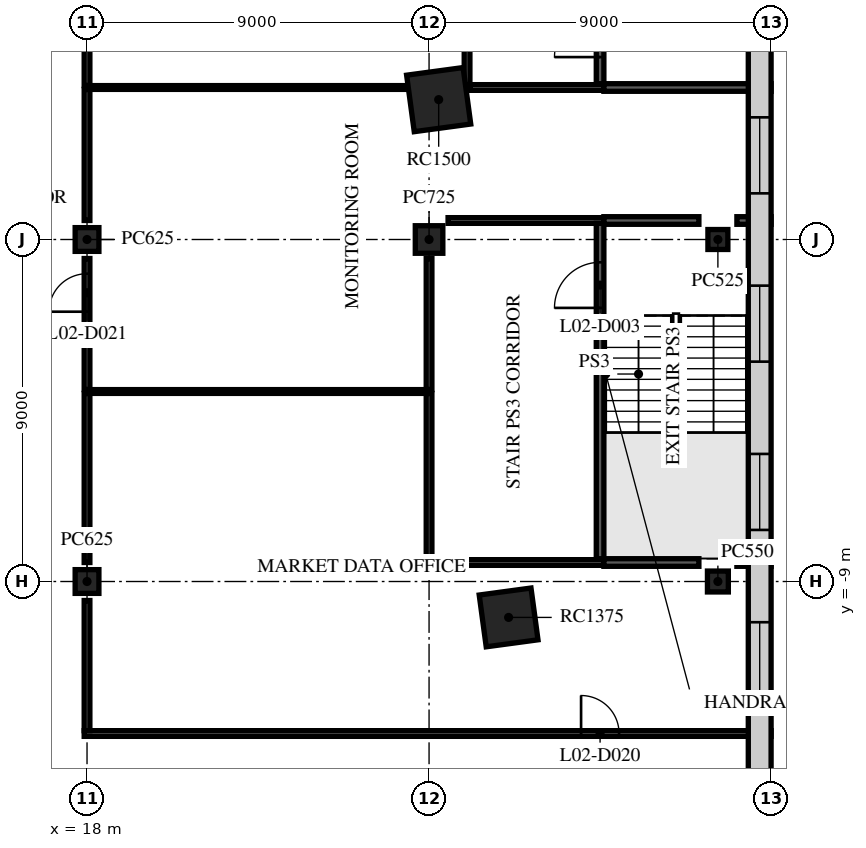
"""IFC4 building model, lengths in metres.
Left out: names, types, materials, properties, quantities, classifications, styles, units other than length and angle.
Written with IfcOpenShell. Run it as: python <this file> out.ifc"""

import sys

from ifc_helpers import new_model, si_unit, direction, frame, frame_2d, origin, origin_2d, place, context, subcontext, project, spatial, rectangle, extrude, element, fill, save


model = new_model("IFC4")
c1 = context("Model", 3, precision=1e-05, world=origin(), true_north=direction((0.0, 1.0)))
c2 = subcontext(c1, "Body", "Model", "MODEL_VIEW")
j1 = project(units=[si_unit("LENGTHUNIT", "METRE"), si_unit("PLANEANGLEUNIT", "RADIAN")], contexts=[c1])
p1 = place(None, origin())
s1 = spatial("IfcSite", under=j1, at=p1, CompositionType="ELEMENT")
p2 = place(p1, origin())
s2 = spatial("IfcBuilding", under=s1, at=p2, CompositionType="ELEMENT")
p3 = place(p2, frame((0.0, 0.0, 9.0)))
s3 = spatial("IfcBuildingStorey", under=s2, at=p3, CompositionType="ELEMENT", Elevation=9.0)
for number, where, z_axis, x_axis in (
    (1, (18.0, -9.0, 0.0), (0.0, 0.0, 1.0), (1.0, 0.0, 0.0)),
    (2, (18.0, 0.0, 0.0), (0.0, 0.0, 1.0), (1.0, 0.0, 0.0)),
):
    element("IfcColumn", number, at=place(p3, frame(where, z_axis=z_axis, x_axis=x_axis)), inside=s3, PredefinedType="COLUMN", context=c2, shape_type="SweptSolid", body=[
        extrude(rectangle(XDim=0.625, YDim=0.625, at=origin_2d()), origin(), (0.0, 0.0, 1.0), 4.5),
    ])
p4 = place(p3, frame((27.0, 0.0, 0.0), z_axis=(0.0, 0.0, 1.0), x_axis=(1.0, 0.0, 0.0)))
e3 = element("IfcColumn", 3, at=p4, inside=s3, PredefinedType="COLUMN", context=c2, shape_type="SweptSolid", body=[
    extrude(rectangle(XDim=0.725, YDim=0.725, at=origin_2d()), origin(), (0.0, 0.0, 1.0), 4.5),
])
p5 = place(p3, frame((34.6, -9.0, 0.0), z_axis=(0.0, 0.0, 1.0), x_axis=(1.0, 0.0, 0.0)))
e4 = element("IfcColumn", 4, at=p5, inside=s3, PredefinedType="COLUMN", context=c2, shape_type="SweptSolid", body=[
    extrude(rectangle(XDim=0.55, YDim=0.55, at=origin_2d()), origin(), (0.0, 0.0, 1.0), 4.5),
])
p6 = place(p3, frame((34.6, 0.0, 0.0), z_axis=(0.0, 0.0, 1.0), x_axis=(1.0, 0.0, 0.0)))
e5 = element("IfcColumn", 5, at=p6, inside=s3, PredefinedType="COLUMN", context=c2, shape_type="SweptSolid", body=[
    extrude(rectangle(XDim=0.525, YDim=0.525, at=origin_2d()), origin(), (0.0, 0.0, 1.0), 4.5),
])
p7 = place(p3, frame((29.093, -9.945, 0.0), z_axis=(0.0, 0.0, 1.0), x_axis=(0.991001197216, 0.133853005627, 0.0)))
e6 = element("IfcColumn", 6, at=p7, inside=s3, PredefinedType="COLUMN", context=c2, shape_type="SweptSolid", body=[
    extrude(rectangle(XDim=1.375, YDim=1.375, at=origin_2d()), origin(), (0.0, 0.0, 1.0), 4.5),
])
p8 = place(p3, frame((27.253, 3.681, 0.0), z_axis=(0.0, 0.0, 1.0), x_axis=(0.991001197216, 0.133853005627, 0.0)))
e7 = element("IfcColumn", 7, at=p8, inside=s3, PredefinedType="COLUMN", context=c2, shape_type="SweptSolid", body=[
    extrude(rectangle(XDim=1.5, YDim=1.5, at=origin_2d()), origin(), (0.0, 0.0, 1.0), 4.5),
])
p9 = place(p3, frame((17.925, -13.0, 0.0), z_axis=(0.0, 0.0, 1.0), x_axis=(1.0, 0.0, 0.0)))
e8 = element("IfcWall", 8, at=p9, inside=s3, PredefinedType="PARTITIONING", context=c2, shape_type="SweptSolid", body=[
    extrude(rectangle(XDim=18.075, YDim=0.15, at=frame_2d((9.038, 0.0))), origin(), (0.0, 0.0, 1.0), 4.1),
])
p10 = place(p9, frame((13.075, 0.0, 0.0)))
e9 = element("IfcOpeningElement", 9, at=p10, cuts=e8, PredefinedType="OPENING", context=c2, shape_type="SweptSolid", body=[
    extrude(rectangle(XDim=1.0, YDim=2.1, at=frame_2d((0.5, 1.05))), frame((0.0, 0.085, 0.0), z_axis=(0.0, -1.0, 0.0), x_axis=(1.0, 0.0, 0.0)), (0.0, 0.0, 1.0), 0.17),
])
p11 = place(p3, frame((26.925, -8.5, 0.0), z_axis=(0.0, 0.0, 1.0), x_axis=(1.0, 0.0, 0.0)))
e10 = element("IfcWall", 10, at=p11, inside=s3, PredefinedType="PARTITIONING", context=c2, shape_type="SweptSolid", body=[
    extrude(rectangle(XDim=4.675, YDim=0.15, at=frame_2d((2.337, 0.0))), origin(), (0.0, 0.0, 1.0), 4.1),
])
p12 = place(p3, frame((31.6, -8.5, 0.0), z_axis=(0.0, 0.0, 1.0), x_axis=(1.0, 0.0, 0.0)))
e11 = element("IfcWall", 11, at=p12, inside=s3, PredefinedType="PARTITIONING", context=c2, shape_type="SweptSolid", body=[
    extrude(rectangle(XDim=2.5, YDim=0.2, at=frame_2d((1.25, 0.0))), origin(), (0.0, 0.0, 1.0), 4.1),
])
p13 = place(p3, frame((35.1, -8.5, 0.0), z_axis=(0.0, 0.0, 1.0), x_axis=(1.0, 0.0, 0.0)))
e12 = element("IfcWall", 12, at=p13, inside=s3, PredefinedType="PARTITIONING", context=c2, shape_type="SweptSolid", body=[
    extrude(rectangle(XDim=0.9, YDim=0.2, at=frame_2d((0.45, 0.0))), origin(), (0.0, 0.0, 1.0), 4.1),
])
p14 = place(p3, frame((18.075, -4.0, 0.0), z_axis=(0.0, 0.0, 1.0), x_axis=(1.0, 0.0, 0.0)))
e13 = element("IfcWall", 13, at=p14, inside=s3, PredefinedType="PARTITIONING", context=c2, shape_type="SweptSolid", body=[
    extrude(rectangle(XDim=8.85, YDim=0.1, at=frame_2d((4.425, 0.0))), origin(), (0.0, 0.0, 1.0), 4.1),
])
p15 = place(p3, frame((27.5, 0.5, 0.0), z_axis=(0.0, 0.0, 1.0), x_axis=(1.0, 0.0, 0.0)))
e14 = element("IfcWall", 14, at=p15, inside=s3, PredefinedType="PARTITIONING", context=c2, shape_type="SweptSolid", body=[
    extrude(rectangle(XDim=4.1, YDim=0.15, at=frame_2d((2.05, 0.0))), origin(), (0.0, 0.0, 1.0), 4.1),
])
p16 = place(p3, frame((31.6, 0.5, 0.0), z_axis=(0.0, 0.0, 1.0), x_axis=(1.0, 0.0, 0.0)))
e15 = element("IfcWall", 15, at=p16, inside=s3, PredefinedType="PARTITIONING", context=c2, shape_type="SweptSolid", body=[
    extrude(rectangle(XDim=2.5, YDim=0.2, at=frame_2d((1.25, 0.0))), origin(), (0.0, 0.0, 1.0), 4.1),
])
p17 = place(p3, frame((35.1, 0.5, 0.0), z_axis=(0.0, 0.0, 1.0), x_axis=(1.0, 0.0, 0.0)))
e16 = element("IfcWall", 16, at=p17, inside=s3, PredefinedType="PARTITIONING", context=c2, shape_type="SweptSolid", body=[
    extrude(rectangle(XDim=0.9, YDim=0.2, at=frame_2d((0.45, 0.0))), origin(), (0.0, 0.0, 1.0), 4.1),
])
p18 = place(p3, frame((18.075, 4.0, 0.0), z_axis=(0.0, 0.0, 1.0), x_axis=(1.0, 0.0, 0.0)))
e17 = element("IfcWall", 17, at=p18, inside=s3, PredefinedType="PARTITIONING", context=c2, shape_type="SweptSolid", body=[
    extrude(rectangle(XDim=8.447, YDim=0.1, at=frame_2d((4.223, 0.0))), origin(), (0.0, 0.0, 1.0), 4.1),
])
p19 = place(p3, frame((28.075, 4.0, 0.0), z_axis=(0.0, 0.0, 1.0), x_axis=(1.0, 0.0, 0.0)))
e18 = element("IfcWall", 18, at=p19, inside=s3, PredefinedType="PARTITIONING", context=c2, shape_type="SweptSolid", body=[
    extrude(rectangle(XDim=3.525, YDim=0.15, at=frame_2d((1.763, 0.0))), origin(), (0.0, 0.0, 1.0), 4.1),
])
p20 = place(p3, frame((31.6, 4.0, 0.0), z_axis=(0.0, 0.0, 1.0), x_axis=(1.0, 0.0, 0.0)))
e19 = element("IfcWall", 19, at=p20, inside=s3, PredefinedType="PARTITIONING", context=c2, shape_type="SweptSolid", body=[
    extrude(rectangle(XDim=4.4, YDim=0.2, at=frame_2d((2.2, 0.0))), origin(), (0.0, 0.0, 1.0), 4.1),
])
p21 = place(p3, frame((18.0, -12.925, 0.0), z_axis=(0.0, 0.0, 1.0), x_axis=(0.0, 1.0, 0.0)))
e20 = element("IfcWall", 20, at=p21, inside=s3, PredefinedType="PARTITIONING", context=c2, shape_type="SweptSolid", body=[
    extrude(rectangle(XDim=3.425, YDim=0.15, at=frame_2d((1.712, 0.0))), origin(), (0.0, 0.0, 1.0), 4.1),
])
p22 = place(p3, frame((18.0, -8.5, 0.0), z_axis=(0.0, 0.0, 1.0), x_axis=(0.0, 1.0, 0.0)))
e21 = element("IfcWall", 21, at=p22, inside=s3, PredefinedType="PARTITIONING", context=c2, shape_type="SweptSolid", body=[
    extrude(rectangle(XDim=4.45, YDim=0.15, at=frame_2d((2.225, 0.0))), origin(), (0.0, 0.0, 1.0), 4.1),
])
p23 = place(p3, frame((18.0, -3.95, 0.0), z_axis=(0.0, 0.0, 1.0), x_axis=(0.0, 1.0, 0.0)))
e22 = element("IfcWall", 22, at=p23, inside=s3, PredefinedType="PARTITIONING", context=c2, shape_type="SweptSolid", body=[
    extrude(rectangle(XDim=3.45, YDim=0.15, at=frame_2d((1.725, 0.0))), origin(), (0.0, 0.0, 1.0), 4.1),
])
p24 = place(p23, frame((2.05, 0.0, 0.0)))
e23 = element("IfcOpeningElement", 23, at=p24, cuts=e22, PredefinedType="OPENING", context=c2, shape_type="SweptSolid", body=[
    extrude(rectangle(XDim=1.0, YDim=2.1, at=frame_2d((0.5, 1.05))), frame((0.0, 0.085, 0.0), z_axis=(0.0, -1.0, 0.0), x_axis=(1.0, 0.0, 0.0)), (0.0, 0.0, 1.0), 0.17),
])
p25 = place(p3, frame((18.0, 0.5, 0.0), z_axis=(0.0, 0.0, 1.0), x_axis=(0.0, 1.0, 0.0)))
e24 = element("IfcWall", 24, at=p25, inside=s3, PredefinedType="PARTITIONING", context=c2, shape_type="SweptSolid", body=[
    extrude(rectangle(XDim=3.45, YDim=0.15, at=frame_2d((1.725, 0.0))), origin(), (0.0, 0.0, 1.0), 4.1),
])
p26 = place(p3, frame((18.0, 4.05, 0.0), z_axis=(0.0, 0.0, 1.0), x_axis=(0.0, 1.0, 0.0)))
e25 = element("IfcWall", 25, at=p26, inside=s3, PredefinedType="PARTITIONING", context=c2, shape_type="SweptSolid", body=[
    extrude(rectangle(XDim=4.45, YDim=0.15, at=frame_2d((2.225, 0.0))), origin(), (0.0, 0.0, 1.0), 4.1),
])
p27 = place(p3, frame((27.0, -8.425, 0.0), z_axis=(0.0, 0.0, 1.0), x_axis=(0.0, 1.0, 0.0)))
e26 = element("IfcWall", 26, at=p27, inside=s3, PredefinedType="PARTITIONING", context=c2, shape_type="SweptSolid", body=[
    extrude(rectangle(XDim=4.375, YDim=0.15, at=frame_2d((2.188, 0.0))), origin(), (0.0, 0.0, 1.0), 4.1),
])
p28 = place(p3, frame((27.0, -3.95, 0.0), z_axis=(0.0, 0.0, 1.0), x_axis=(0.0, 1.0, 0.0)))
e27 = element("IfcWall", 27, at=p28, inside=s3, PredefinedType="PARTITIONING", context=c2, shape_type="SweptSolid", body=[
    extrude(rectangle(XDim=3.45, YDim=0.15, at=frame_2d((1.725, 0.0))), origin(), (0.0, 0.0, 1.0), 4.1),
])
p29 = place(p3, frame((28.0, 4.075, 0.0), z_axis=(0.0, 0.0, 1.0), x_axis=(0.0, 1.0, 0.0)))
e28 = element("IfcWall", 28, at=p29, inside=s3, PredefinedType="PARTITIONING", context=c2, shape_type="SweptSolid", body=[
    extrude(rectangle(XDim=8.85, YDim=0.15, at=frame_2d((4.425, 0.0))), origin(), (0.0, 0.0, 1.0), 4.1),
])
p30 = place(p3, frame((31.5, -8.4, 0.0), z_axis=(0.0, 0.0, 1.0), x_axis=(0.0, 1.0, 0.0)))
e29 = element("IfcWall", 29, at=p30, inside=s3, PredefinedType="PARTITIONING", context=c2, shape_type="SweptSolid", body=[
    extrude(rectangle(XDim=8.825, YDim=0.2, at=frame_2d((4.413, 0.0))), origin(), (0.0, 0.0, 1.0), 4.1),
])
p31 = place(p30, frame((6.6, 0.0, 0.0)))
e30 = element("IfcOpeningElement", 30, at=p31, cuts=e29, PredefinedType="OPENING", context=c2, shape_type="SweptSolid", body=[
    extrude(rectangle(XDim=1.2, YDim=2.1, at=frame_2d((0.6, 1.05))), frame((0.0, 0.11, 0.0), z_axis=(0.0, -1.0, 0.0), x_axis=(1.0, 0.0, 0.0)), (0.0, 0.0, 1.0), 0.22),
])
p32 = place(p3, frame((31.5, 4.1, 0.0), z_axis=(0.0, 0.0, 1.0), x_axis=(0.0, 1.0, 0.0)))
e31 = element("IfcWall", 31, at=p32, inside=s3, PredefinedType="PARTITIONING", context=c2, shape_type="SweptSolid", body=[
    extrude(rectangle(XDim=8.8, YDim=0.2, at=frame_2d((4.4, 0.0))), origin(), (0.0, 0.0, 1.0), 4.1),
])
p33 = place(p32, frame((0.7, 0.0, 0.0)))
e32 = element("IfcOpeningElement", 32, at=p33, cuts=e31, PredefinedType="OPENING", context=c2, shape_type="SweptSolid", body=[
    extrude(rectangle(XDim=1.2, YDim=2.1, at=frame_2d((0.6, 1.05))), frame((0.0, 0.11, 0.0), z_axis=(0.0, -1.0, 0.0), x_axis=(1.0, 0.0, 0.0)), (0.0, 0.0, 1.0), 0.22),
])
p34 = place(p3, frame((35.7, -30.876, 0.0), z_axis=(0.0, 0.0, 1.0), x_axis=(0.0, 1.0, 0.0)))
e33 = element("IfcWall", 33, at=p34, inside=s3, PredefinedType="STANDARD", context=c2, shape_type="SweptSolid", body=[
    extrude(rectangle(XDim=61.751, YDim=0.6, at=frame_2d((30.876, 0.0))), origin(), (0.0, 0.0, 1.0), 4.1),
])
p35 = place(p34, frame((1.152, 0.0, 0.9)))
e34 = element("IfcOpeningElement", 34, at=p35, cuts=e33, PredefinedType="OPENING", context=c2, shape_type="SweptSolid", body=[
    extrude(rectangle(XDim=2.0, YDim=3.0, at=frame_2d((1.0, 1.5))), frame((0.0, 0.31, 0.0), z_axis=(0.0, -1.0, 0.0), x_axis=(1.0, 0.0, 0.0)), (0.0, 0.0, 1.0), 0.62),
])
p36 = place(p34, frame((5.519, 0.0, 0.9)))
e35 = element("IfcOpeningElement", 35, at=p36, cuts=e33, PredefinedType="OPENING", context=c2, shape_type="SweptSolid", body=[
    extrude(rectangle(XDim=2.0, YDim=3.0, at=frame_2d((1.0, 1.5))), frame((0.0, 0.31, 0.0), z_axis=(0.0, -1.0, 0.0), x_axis=(1.0, 0.0, 0.0)), (0.0, 0.0, 1.0), 0.62),
])
p37 = place(p34, frame((9.947, 0.0, 0.9)))
e36 = element("IfcOpeningElement", 36, at=p37, cuts=e33, PredefinedType="OPENING", context=c2, shape_type="SweptSolid", body=[
    extrude(rectangle(XDim=2.0, YDim=3.0, at=frame_2d((1.0, 1.5))), frame((0.0, 0.31, 0.0), z_axis=(0.0, -1.0, 0.0), x_axis=(1.0, 0.0, 0.0)), (0.0, 0.0, 1.0), 0.62),
])
p38 = place(p34, frame((14.376, 0.0, 0.9)))
e37 = element("IfcOpeningElement", 37, at=p38, cuts=e33, PredefinedType="OPENING", context=c2, shape_type="SweptSolid", body=[
    extrude(rectangle(XDim=2.0, YDim=3.0, at=frame_2d((1.0, 1.5))), frame((0.0, 0.31, 0.0), z_axis=(0.0, -1.0, 0.0), x_axis=(1.0, 0.0, 0.0)), (0.0, 0.0, 1.0), 0.62),
])
p39 = place(p34, frame((18.804, 0.0, 0.9)))
e38 = element("IfcOpeningElement", 38, at=p39, cuts=e33, PredefinedType="OPENING", context=c2, shape_type="SweptSolid", body=[
    extrude(rectangle(XDim=2.0, YDim=3.0, at=frame_2d((1.0, 1.5))), frame((0.0, 0.31, 0.0), z_axis=(0.0, -1.0, 0.0), x_axis=(1.0, 0.0, 0.0)), (0.0, 0.0, 1.0), 0.62),
])
p40 = place(p34, frame((23.233, 0.0, 0.9)))
e39 = element("IfcOpeningElement", 39, at=p40, cuts=e33, PredefinedType="OPENING", context=c2, shape_type="SweptSolid", body=[
    extrude(rectangle(XDim=2.0, YDim=3.0, at=frame_2d((1.0, 1.5))), frame((0.0, 0.31, 0.0), z_axis=(0.0, -1.0, 0.0), x_axis=(1.0, 0.0, 0.0)), (0.0, 0.0, 1.0), 0.62),
])
p41 = place(p34, frame((27.662, 0.0, 0.9)))
e40 = element("IfcOpeningElement", 40, at=p41, cuts=e33, PredefinedType="OPENING", context=c2, shape_type="SweptSolid", body=[
    extrude(rectangle(XDim=2.0, YDim=3.0, at=frame_2d((1.0, 1.5))), frame((0.0, 0.31, 0.0), z_axis=(0.0, -1.0, 0.0), x_axis=(1.0, 0.0, 0.0)), (0.0, 0.0, 1.0), 0.62),
])
p42 = place(p34, frame((32.09, 0.0, 0.9)))
e41 = element("IfcOpeningElement", 41, at=p42, cuts=e33, PredefinedType="OPENING", context=c2, shape_type="SweptSolid", body=[
    extrude(rectangle(XDim=2.0, YDim=3.0, at=frame_2d((1.0, 1.5))), frame((0.0, 0.31, 0.0), z_axis=(0.0, -1.0, 0.0), x_axis=(1.0, 0.0, 0.0)), (0.0, 0.0, 1.0), 0.62),
])
p43 = place(p34, frame((36.519, 0.0, 0.9)))
e42 = element("IfcOpeningElement", 42, at=p43, cuts=e33, PredefinedType="OPENING", context=c2, shape_type="SweptSolid", body=[
    extrude(rectangle(XDim=2.0, YDim=3.0, at=frame_2d((1.0, 1.5))), frame((0.0, 0.31, 0.0), z_axis=(0.0, -1.0, 0.0), x_axis=(1.0, 0.0, 0.0)), (0.0, 0.0, 1.0), 0.62),
])
p44 = place(p34, frame((45.376, 0.0, 0.9)))
e43 = element("IfcOpeningElement", 43, at=p44, cuts=e33, PredefinedType="OPENING", context=c2, shape_type="SweptSolid", body=[
    extrude(rectangle(XDim=2.0, YDim=3.0, at=frame_2d((1.0, 1.5))), frame((0.0, 0.31, 0.0), z_axis=(0.0, -1.0, 0.0), x_axis=(1.0, 0.0, 0.0)), (0.0, 0.0, 1.0), 0.62),
])
p45 = place(p34, frame((49.804, 0.0, 0.9)))
e44 = element("IfcOpeningElement", 44, at=p45, cuts=e33, PredefinedType="OPENING", context=c2, shape_type="SweptSolid", body=[
    extrude(rectangle(XDim=2.0, YDim=3.0, at=frame_2d((1.0, 1.5))), frame((0.0, 0.31, 0.0), z_axis=(0.0, -1.0, 0.0), x_axis=(1.0, 0.0, 0.0)), (0.0, 0.0, 1.0), 0.62),
])
p46 = place(p34, frame((58.599, 0.0, 0.9)))
e45 = element("IfcOpeningElement", 45, at=p46, cuts=e33, PredefinedType="OPENING", context=c2, shape_type="SweptSolid", body=[
    extrude(rectangle(XDim=2.0, YDim=3.0, at=frame_2d((1.0, 1.5))), frame((0.0, 0.31, 0.0), z_axis=(0.0, -1.0, 0.0), x_axis=(1.0, 0.0, 0.0)), (0.0, 0.0, 1.0), 0.62),
])
p47 = place(p31, frame((1.2, 0.0, 0.0), z_axis=(0.0, 0.0, 1.0), x_axis=(-1.0, 0.0, 0.0)))
e46 = element("IfcDoor", 46, at=p47, inside=s3, OperationType="SINGLE_SWING_LEFT", PredefinedType="DOOR", context=c2, shape_type="SweptSolid", body=[
    extrude(rectangle(XDim=1.2, YDim=2.1, at=frame_2d((0.6, 1.05))), frame((0.0, 0.025, 0.0), z_axis=(0.0, -1.0, 0.0), x_axis=(1.0, 0.0, 0.0)), (0.0, 0.0, 1.0), 0.05),
])
fill(e30, e46)
p48 = place(p33, frame((1.2, 0.0, 0.0), z_axis=(0.0, 0.0, 1.0), x_axis=(-1.0, 0.0, 0.0)))
e47 = element("IfcDoor", 47, at=p48, inside=s3, OperationType="SINGLE_SWING_RIGHT", PredefinedType="DOOR", context=c2, shape_type="SweptSolid", body=[
    extrude(rectangle(XDim=1.2, YDim=2.1, at=frame_2d((0.6, 1.05))), frame((0.0, 0.025, 0.0), z_axis=(0.0, -1.0, 0.0), x_axis=(1.0, 0.0, 0.0)), (0.0, 0.0, 1.0), 0.05),
])
fill(e32, e47)
p49 = place(p10, origin())
e48 = element("IfcDoor", 48, at=p49, inside=s3, OperationType="SINGLE_SWING_RIGHT", PredefinedType="DOOR", context=c2, shape_type="SweptSolid", body=[
    extrude(rectangle(XDim=1.0, YDim=2.1, at=frame_2d((0.5, 1.05))), frame((0.0, 0.025, 0.0), z_axis=(0.0, -1.0, 0.0), x_axis=(1.0, 0.0, 0.0)), (0.0, 0.0, 1.0), 0.05),
])
fill(e9, e48)
p50 = place(p24, origin())
e49 = element("IfcDoor", 49, at=p50, inside=s3, OperationType="SINGLE_SWING_LEFT", PredefinedType="DOOR", context=c2, shape_type="SweptSolid", body=[
    extrude(rectangle(XDim=1.0, YDim=2.1, at=frame_2d((0.5, 1.05))), frame((0.0, 0.025, 0.0), z_axis=(0.0, -1.0, 0.0), x_axis=(1.0, 0.0, 0.0)), (0.0, 0.0, 1.0), 0.05),
])
fill(e23, e49)
p51 = place(p39, origin())
e50 = element("IfcWindow", 50, at=p51, inside=s3, PartitioningType="SINGLE_PANEL", PredefinedType="WINDOW", context=c2, shape_type="SweptSolid", body=[
    extrude(rectangle(XDim=2.0, YDim=3.0, at=frame_2d((1.0, 1.5))), frame((0.0, 0.03, 0.0), z_axis=(0.0, -1.0, 0.0), x_axis=(1.0, 0.0, 0.0)), (0.0, 0.0, 1.0), 0.06),
])
fill(e38, e50)
p52 = place(p40, origin())
e51 = element("IfcWindow", 51, at=p52, inside=s3, PartitioningType="SINGLE_PANEL", PredefinedType="WINDOW", context=c2, shape_type="SweptSolid", body=[
    extrude(rectangle(XDim=2.0, YDim=3.0, at=frame_2d((1.0, 1.5))), frame((0.0, 0.03, 0.0), z_axis=(0.0, -1.0, 0.0), x_axis=(1.0, 0.0, 0.0)), (0.0, 0.0, 1.0), 0.06),
])
fill(e39, e51)
p53 = place(p41, origin())
e52 = element("IfcWindow", 52, at=p53, inside=s3, PartitioningType="SINGLE_PANEL", PredefinedType="WINDOW", context=c2, shape_type="SweptSolid", body=[
    extrude(rectangle(XDim=2.0, YDim=3.0, at=frame_2d((1.0, 1.5))), frame((0.0, 0.03, 0.0), z_axis=(0.0, -1.0, 0.0), x_axis=(1.0, 0.0, 0.0)), (0.0, 0.0, 1.0), 0.06),
])
fill(e40, e52)
p54 = place(p42, origin())
e53 = element("IfcWindow", 53, at=p54, inside=s3, PartitioningType="SINGLE_PANEL", PredefinedType="WINDOW", context=c2, shape_type="SweptSolid", body=[
    extrude(rectangle(XDim=2.0, YDim=3.0, at=frame_2d((1.0, 1.5))), frame((0.0, 0.03, 0.0), z_axis=(0.0, -1.0, 0.0), x_axis=(1.0, 0.0, 0.0)), (0.0, 0.0, 1.0), 0.06),
])
fill(e41, e53)
save(model, sys.argv[1])
